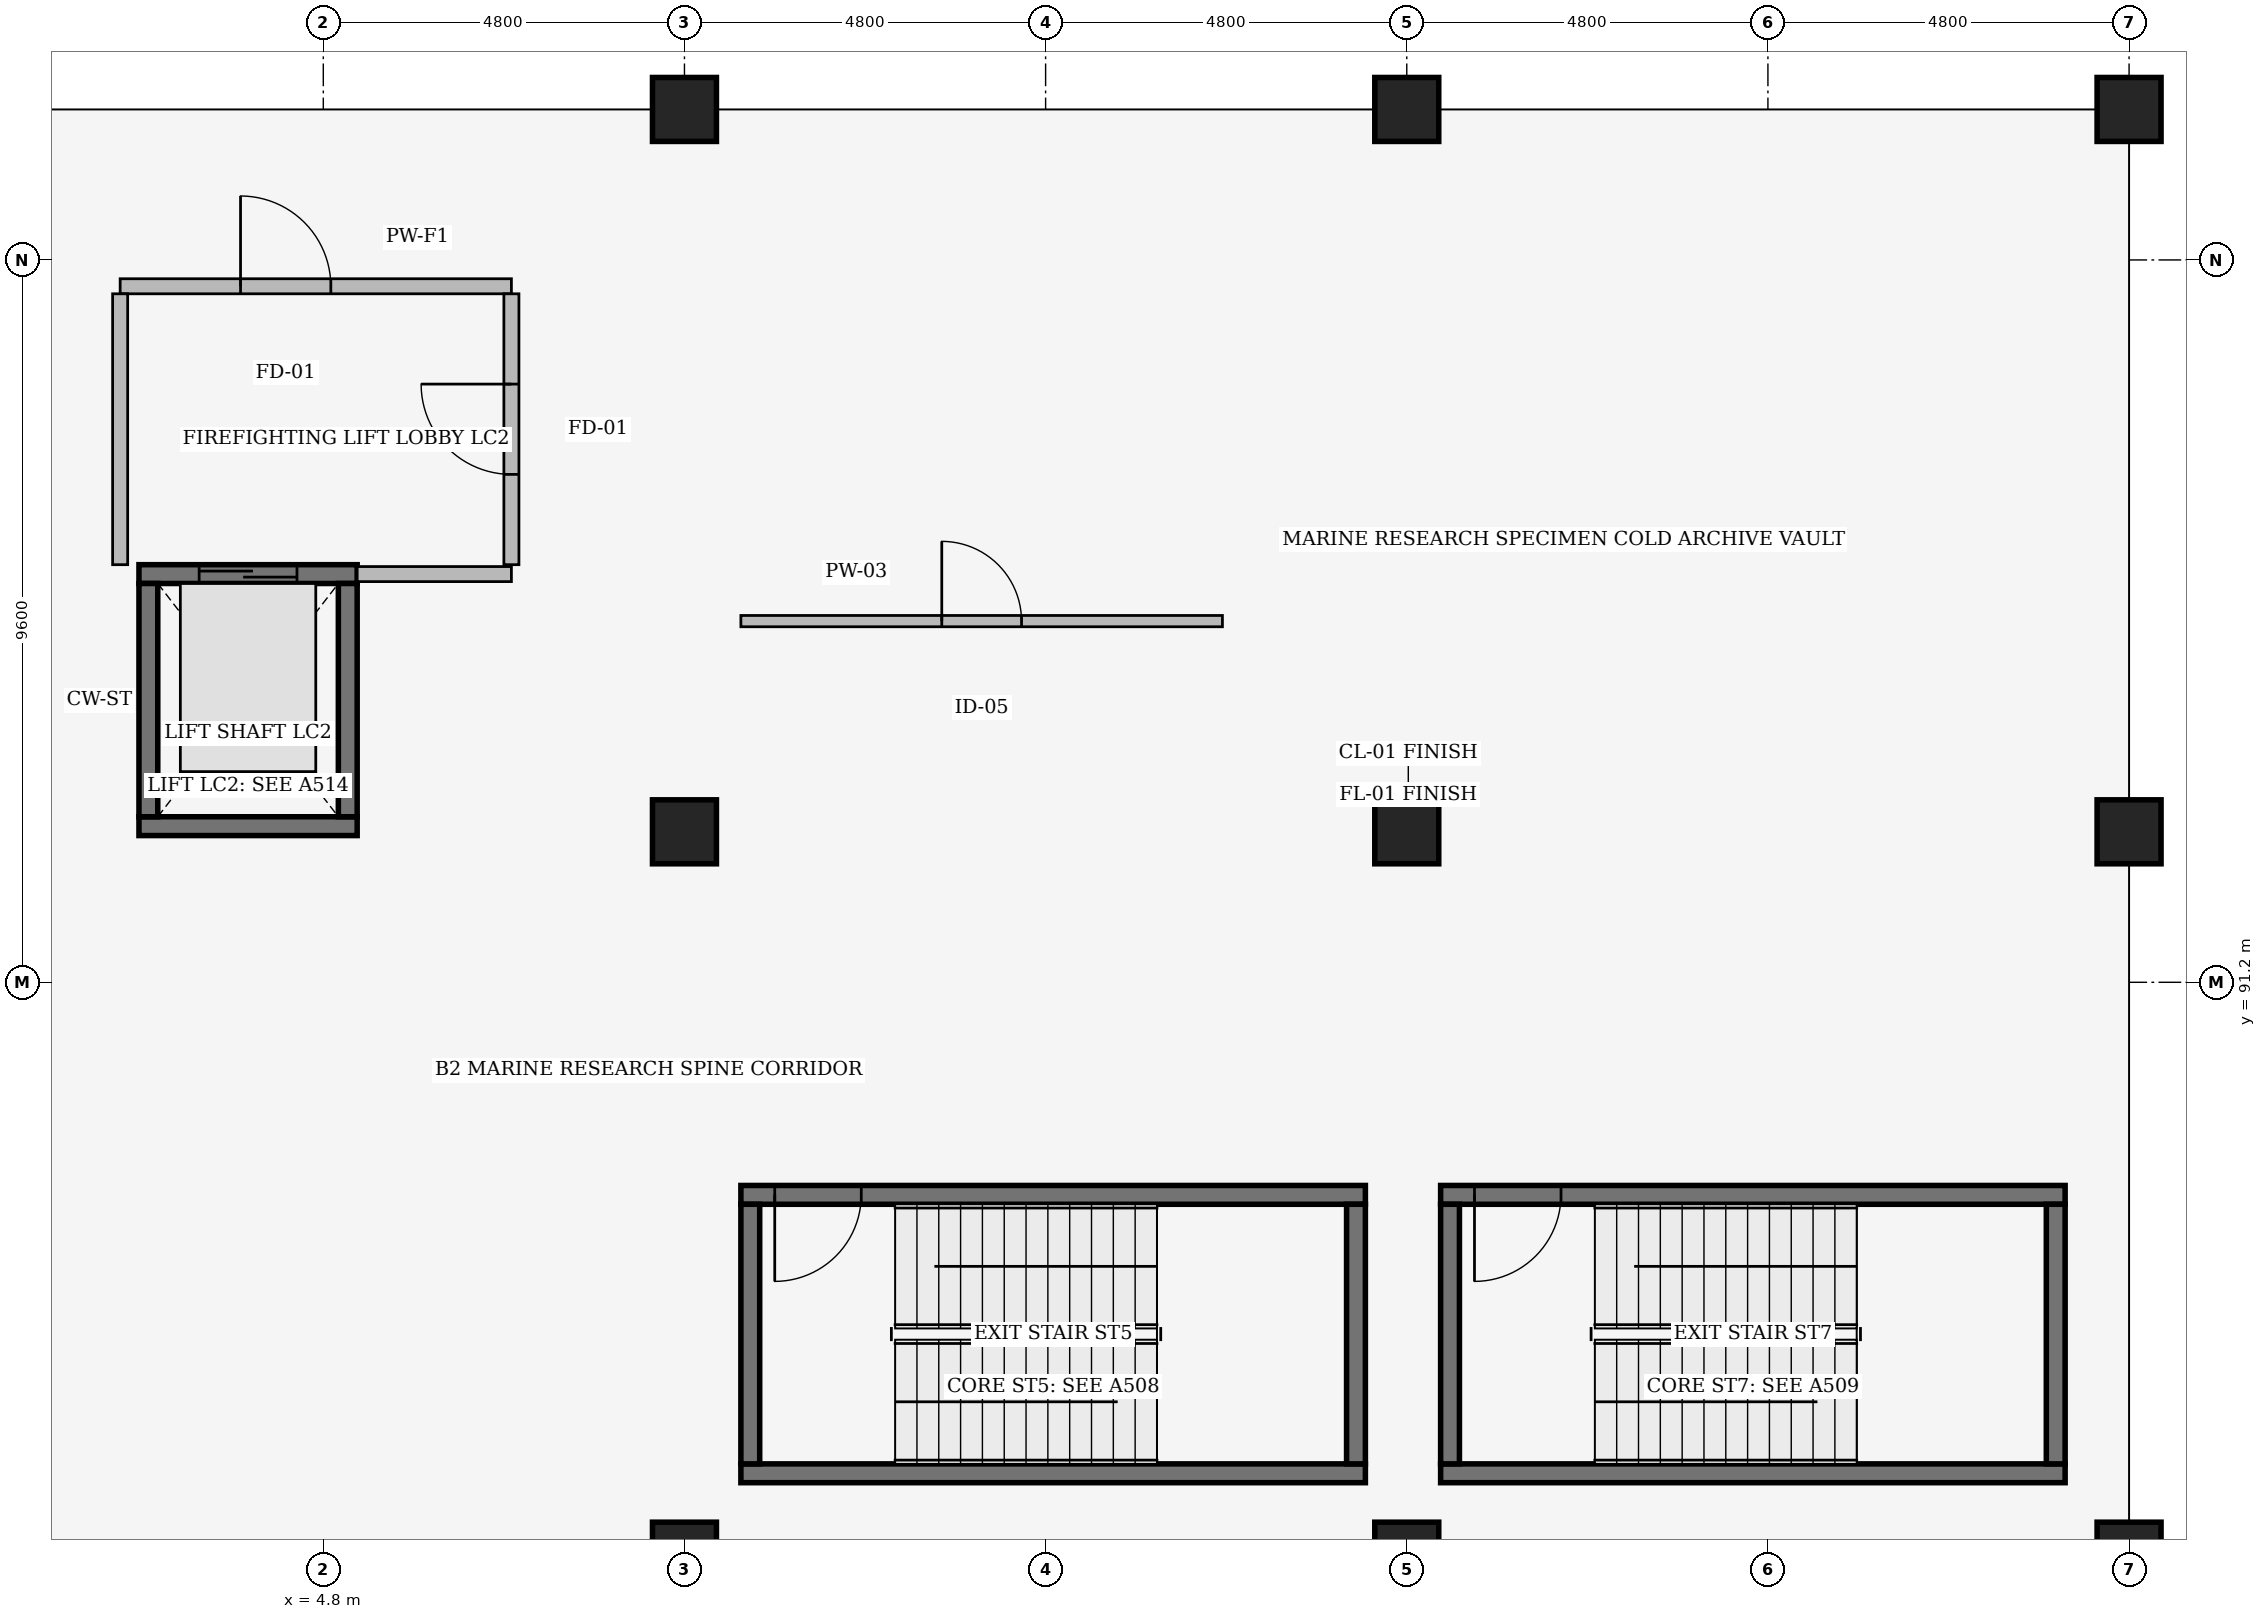
"""IFC4 building model, lengths in metres.
Left out: names, types, materials, properties, quantities, classifications, styles, units other than length and angle.
Written with IfcOpenShell. Run it as: python <this file> out.ifc"""

import sys

from ifc_helpers import new_model, si_unit, direction, frame, frame_2d, origin, origin_2d, place, context, subcontext, project, spatial, rectangle, extrude, element, fill, save


model = new_model("IFC4")
c1 = context("Model", 3, precision=1e-05, world=origin(), true_north=direction((0.0, 1.0)))
c2 = subcontext(c1, "Body", "Model", "MODEL_VIEW")
j1 = project(units=[si_unit("LENGTHUNIT", "METRE"), si_unit("PLANEANGLEUNIT", "RADIAN")], contexts=[c1])
p1 = place(None, origin())
s1 = spatial("IfcSite", under=j1, at=p1, CompositionType="ELEMENT")
p2 = place(p1, origin())
s2 = spatial("IfcBuilding", under=s1, at=p2, CompositionType="ELEMENT")
p3 = place(p2, frame((0.0, 0.0, -9.6)))
s3 = spatial("IfcBuildingStorey", under=s2, at=p3, CompositionType="ELEMENT", Elevation=-9.6)
for number, where, z_axis, x_axis in (
    (1, (9.6, 83.6, 0.0), (0.0, 0.0, 1.0), (1.0, 0.0, 0.0)),
    (2, (9.6, 93.2, 0.0), (0.0, 0.0, 1.0), (1.0, 0.0, 0.0)),
    (3, (9.6, 102.8, 0.0), (0.0, 0.0, 1.0), (1.0, 0.0, 0.0)),
    (4, (19.2, 83.6, 0.0), (0.0, 0.0, 1.0), (1.0, 0.0, 0.0)),
    (5, (19.2, 93.2, 0.0), (0.0, 0.0, 1.0), (1.0, 0.0, 0.0)),
    (6, (19.2, 102.8, 0.0), (0.0, 0.0, 1.0), (1.0, 0.0, 0.0)),
    (7, (28.8, 83.6, 0.0), (0.0, 0.0, 1.0), (1.0, 0.0, 0.0)),
    (8, (28.8, 93.2, 0.0), (0.0, 0.0, 1.0), (1.0, 0.0, 0.0)),
    (9, (28.8, 102.8, 0.0), (0.0, 0.0, 1.0), (1.0, 0.0, 0.0)),
):
    element("IfcColumn", number, at=place(p3, frame(where, z_axis=z_axis, x_axis=x_axis)), inside=s3, PredefinedType="COLUMN", context=c2, shape_type="SweptSolid", body=[
        extrude(rectangle(XDim=0.85, YDim=0.85, at=origin_2d()), origin(), (0.0, 0.0, 1.0), 4.8),
    ])
p4 = place(p3, frame((10.35, 84.675, 0.0), z_axis=(0.0, 0.0, 1.0), x_axis=(1.0, 0.0, 0.0)))
e10 = element("IfcWall", 10, at=p4, inside=s3, PredefinedType="SHEAR", context=c2, shape_type="SweptSolid", body=[
    extrude(rectangle(XDim=8.3, YDim=0.25, at=frame_2d((4.15, 0.0))), origin(), (0.0, 0.0, 1.0), 4.5),
])
p5 = place(p3, frame((18.65, 88.375, 0.0), z_axis=(0.0, 0.0, 1.0), x_axis=(-1.0, 0.0, 0.0)))
e11 = element("IfcWall", 11, at=p5, inside=s3, PredefinedType="SHEAR", context=c2, shape_type="SweptSolid", body=[
    extrude(rectangle(XDim=8.3, YDim=0.25, at=frame_2d((4.15, 0.0))), origin(), (0.0, 0.0, 1.0), 4.5),
])
p6 = place(p5, frame((7.85, 0.0, 0.0), z_axis=(0.0, 0.0, 1.0), x_axis=(-1.0, 0.0, 0.0)))
e12 = element("IfcOpeningElement", 12, at=p6, cuts=e11, PredefinedType="OPENING", context=c2, shape_type="SweptSolid", body=[
    extrude(rectangle(XDim=1.15, YDim=2.2, at=frame_2d((0.575, 1.1))), frame((0.0, 0.135, 0.0), z_axis=(0.0, -1.0, 0.0), x_axis=(1.0, 0.0, 0.0)), (0.0, 0.0, 1.0), 0.27),
])
for number, where, z_axis, x_axis in (
    (13, (10.475, 88.25, 0.0), (0.0, 0.0, 1.0), (0.0, -1.0, 0.0)),
    (14, (18.525, 84.8, 0.0), (0.0, 0.0, 1.0), (0.0, 1.0, 0.0)),
):
    element("IfcWall", number, at=place(p3, frame(where, z_axis=z_axis, x_axis=x_axis)), inside=s3, PredefinedType="SHEAR", context=c2, shape_type="SweptSolid", body=[
        extrude(rectangle(XDim=3.45, YDim=0.25, at=frame_2d((1.725, 0.0))), origin(), (0.0, 0.0, 1.0), 4.5),
    ])
p7 = place(p3, frame((19.65, 84.675, 0.0), z_axis=(0.0, 0.0, 1.0), x_axis=(1.0, 0.0, 0.0)))
e15 = element("IfcWall", 15, at=p7, inside=s3, PredefinedType="SHEAR", context=c2, shape_type="SweptSolid", body=[
    extrude(rectangle(XDim=8.3, YDim=0.25, at=frame_2d((4.15, 0.0))), origin(), (0.0, 0.0, 1.0), 4.5),
])
p8 = place(p3, frame((27.95, 88.375, 0.0), z_axis=(0.0, 0.0, 1.0), x_axis=(-1.0, 0.0, 0.0)))
e16 = element("IfcWall", 16, at=p8, inside=s3, PredefinedType="SHEAR", context=c2, shape_type="SweptSolid", body=[
    extrude(rectangle(XDim=8.3, YDim=0.25, at=frame_2d((4.15, 0.0))), origin(), (0.0, 0.0, 1.0), 4.5),
])
p9 = place(p8, frame((7.85, 0.0, 0.0), z_axis=(0.0, 0.0, 1.0), x_axis=(-1.0, 0.0, 0.0)))
e17 = element("IfcOpeningElement", 17, at=p9, cuts=e16, PredefinedType="OPENING", context=c2, shape_type="SweptSolid", body=[
    extrude(rectangle(XDim=1.15, YDim=2.2, at=frame_2d((0.575, 1.1))), frame((0.0, 0.135, 0.0), z_axis=(0.0, -1.0, 0.0), x_axis=(1.0, 0.0, 0.0)), (0.0, 0.0, 1.0), 0.27),
])
for number, where, z_axis, x_axis in (
    (18, (19.775, 88.25, 0.0), (0.0, 0.0, 1.0), (0.0, -1.0, 0.0)),
    (19, (27.825, 84.8, 0.0), (0.0, 0.0, 1.0), (0.0, 1.0, 0.0)),
):
    element("IfcWall", number, at=place(p3, frame(where, z_axis=z_axis, x_axis=x_axis)), inside=s3, PredefinedType="SHEAR", context=c2, shape_type="SweptSolid", body=[
        extrude(rectangle(XDim=3.45, YDim=0.25, at=frame_2d((1.725, 0.0))), origin(), (0.0, 0.0, 1.0), 4.5),
    ])
p10 = place(p3, frame((2.35, 93.275, 0.0), z_axis=(0.0, 0.0, 1.0), x_axis=(1.0, 0.0, 0.0)))
e20 = element("IfcWall", 20, at=p10, inside=s3, PredefinedType="SHEAR", context=c2, shape_type="SweptSolid", body=[
    extrude(rectangle(XDim=2.9, YDim=0.25, at=frame_2d((1.45, 0.0))), origin(), (0.0, 0.0, 1.0), 4.5),
])
p11 = place(p3, frame((2.35, 96.625, 0.0), z_axis=(0.0, 0.0, 1.0), x_axis=(1.0, 0.0, 0.0)))
e21 = element("IfcWall", 21, at=p11, inside=s3, PredefinedType="SHEAR", context=c2, shape_type="SweptSolid", body=[
    extrude(rectangle(XDim=2.9, YDim=0.25, at=frame_2d((1.45, 0.0))), origin(), (0.0, 0.0, 1.0), 4.5),
])
p12 = place(p11, frame((0.8, 0.0, 0.0)))
e22 = element("IfcOpeningElement", 22, at=p12, cuts=e21, PredefinedType="OPENING", context=c2, shape_type="SweptSolid", body=[
    extrude(rectangle(XDim=1.3, YDim=2.2, at=frame_2d((0.65, 1.1))), frame((0.0, 0.135, 0.0), z_axis=(0.0, -1.0, 0.0), x_axis=(1.0, 0.0, 0.0)), (0.0, 0.0, 1.0), 0.27),
])
for number, where, z_axis, x_axis in (
    (23, (2.475, 93.4, 0.0), (0.0, 0.0, 1.0), (0.0, 1.0, 0.0)),
    (24, (5.125, 93.4, 0.0), (0.0, 0.0, 1.0), (0.0, 1.0, 0.0)),
):
    element("IfcWall", number, at=place(p3, frame(where, z_axis=z_axis, x_axis=x_axis)), inside=s3, PredefinedType="SHEAR", context=c2, shape_type="SweptSolid", body=[
        extrude(rectangle(XDim=3.1, YDim=0.25, at=frame_2d((1.55, 0.0))), origin(), (0.0, 0.0, 1.0), 4.5),
    ])
p13 = place(p3, frame((2.1, 100.45, 0.0), z_axis=(0.0, 0.0, 1.0), x_axis=(1.0, 0.0, 0.0)))
e25 = element("IfcWall", 25, at=p13, inside=s3, PredefinedType="PARTITIONING", context=c2, shape_type="SweptSolid", body=[
    extrude(rectangle(XDim=5.2, YDim=0.2, at=frame_2d((2.6, 0.0))), origin(), (0.0, 0.0, 1.0), 4.214),
])
p14 = place(p13, frame((1.6, 0.0, 0.0)))
e26 = element("IfcOpeningElement", 26, at=p14, cuts=e25, PredefinedType="OPENING", context=c2, shape_type="SweptSolid", body=[
    extrude(rectangle(XDim=1.2, YDim=2.2, at=frame_2d((0.6, 1.1))), frame((0.0, 0.11, 0.0), z_axis=(0.0, -1.0, 0.0), x_axis=(1.0, 0.0, 0.0)), (0.0, 0.0, 1.0), 0.22),
])
p15 = place(p3, frame((2.1, 96.75, 0.0), z_axis=(0.0, 0.0, 1.0), x_axis=(0.0, 1.0, 0.0)))
e27 = element("IfcWall", 27, at=p15, inside=s3, PredefinedType="PARTITIONING", context=c2, shape_type="SweptSolid", body=[
    extrude(rectangle(XDim=3.6, YDim=0.2, at=frame_2d((1.8, 0.0))), origin(), (0.0, 0.0, 1.0), 4.156),
])
p16 = place(p3, frame((7.3, 96.75, 0.0), z_axis=(0.0, 0.0, 1.0), x_axis=(0.0, 1.0, 0.0)))
e28 = element("IfcWall", 28, at=p16, inside=s3, PredefinedType="PARTITIONING", context=c2, shape_type="SweptSolid", body=[
    extrude(rectangle(XDim=3.6, YDim=0.2, at=frame_2d((1.8, 0.0))), origin(), (0.0, 0.0, 1.0), 4.156),
])
p17 = place(p16, frame((1.2, 0.0, 0.0)))
e29 = element("IfcOpeningElement", 29, at=p17, cuts=e28, PredefinedType="OPENING", context=c2, shape_type="SweptSolid", body=[
    extrude(rectangle(XDim=1.2, YDim=2.2, at=frame_2d((0.6, 1.1))), frame((0.0, 0.11, 0.0), z_axis=(0.0, -1.0, 0.0), x_axis=(1.0, 0.0, 0.0)), (0.0, 0.0, 1.0), 0.22),
])
p18 = place(p3, frame((5.25, 96.625, 0.0), z_axis=(0.0, 0.0, 1.0), x_axis=(1.0, 0.0, 0.0)))
e30 = element("IfcWall", 30, at=p18, inside=s3, PredefinedType="PARTITIONING", context=c2, shape_type="SweptSolid", body=[
    extrude(rectangle(XDim=2.05, YDim=0.2, at=frame_2d((1.025, 0.0))), origin(), (0.0, 0.0, 1.0), 4.44),
])
p19 = place(p3, frame((10.35, 96.0, 0.0), z_axis=(0.0, 0.0, 1.0), x_axis=(1.0, 0.0, 0.0)))
e31 = element("IfcWall", 31, at=p19, inside=s3, PredefinedType="PARTITIONING", context=c2, shape_type="SweptSolid", body=[
    extrude(rectangle(XDim=6.4, YDim=0.15, at=frame_2d((3.2, 0.0))), origin(), (0.0, 0.0, 1.0), 4.049),
])
p20 = place(p19, frame((2.67, 0.0, 0.0)))
e32 = element("IfcOpeningElement", 32, at=p20, cuts=e31, PredefinedType="OPENING", context=c2, shape_type="SweptSolid", body=[
    extrude(rectangle(XDim=1.06, YDim=2.2, at=frame_2d((0.53, 1.1))), frame((0.0, 0.085, 0.0), z_axis=(0.0, -1.0, 0.0), x_axis=(1.0, 0.0, 0.0)), (0.0, 0.0, 1.0), 0.17),
])
p21 = place(p6, origin())
e33 = element("IfcDoor", 33, at=p21, inside=s3, OperationType="SINGLE_SWING_LEFT", PredefinedType="DOOR", context=c2, shape_type="SweptSolid", body=[
    extrude(rectangle(XDim=1.15, YDim=2.2, at=frame_2d((0.575, 1.1))), frame((0.0, 0.025, 0.0), z_axis=(0.0, -1.0, 0.0), x_axis=(1.0, 0.0, 0.0)), (0.0, 0.0, 1.0), 0.05),
])
fill(e12, e33)
p22 = place(p9, origin())
e34 = element("IfcDoor", 34, at=p22, inside=s3, OperationType="SINGLE_SWING_LEFT", PredefinedType="DOOR", context=c2, shape_type="SweptSolid", body=[
    extrude(rectangle(XDim=1.15, YDim=2.2, at=frame_2d((0.575, 1.1))), frame((0.0, 0.025, 0.0), z_axis=(0.0, -1.0, 0.0), x_axis=(1.0, 0.0, 0.0)), (0.0, 0.0, 1.0), 0.05),
])
fill(e17, e34)
p23 = place(p12, origin())
e35 = element("IfcDoor", 35, at=p23, inside=s3, OperationType="DOUBLE_DOOR_SLIDING", PredefinedType="DOOR", context=c2, shape_type="SweptSolid", body=[
    extrude(rectangle(XDim=1.3, YDim=2.2, at=frame_2d((0.65, 1.1))), frame((0.0, 0.025, 0.0), z_axis=(0.0, -1.0, 0.0), x_axis=(1.0, 0.0, 0.0)), (0.0, 0.0, 1.0), 0.05),
])
fill(e22, e35)
p24 = place(p17, origin())
e36 = element("IfcDoor", 36, at=p24, inside=s3, OperationType="SINGLE_SWING_RIGHT", PredefinedType="DOOR", context=c2, shape_type="SweptSolid", body=[
    extrude(rectangle(XDim=1.2, YDim=2.2, at=frame_2d((0.6, 1.1))), frame((0.0, 0.025, 0.0), z_axis=(0.0, -1.0, 0.0), x_axis=(1.0, 0.0, 0.0)), (0.0, 0.0, 1.0), 0.05),
])
fill(e29, e36)
p25 = place(p14, origin())
e37 = element("IfcDoor", 37, at=p25, inside=s3, OperationType="SINGLE_SWING_LEFT", PredefinedType="DOOR", context=c2, shape_type="SweptSolid", body=[
    extrude(rectangle(XDim=1.2, YDim=2.2, at=frame_2d((0.6, 1.1))), frame((0.0, 0.025, 0.0), z_axis=(0.0, -1.0, 0.0), x_axis=(1.0, 0.0, 0.0)), (0.0, 0.0, 1.0), 0.05),
])
fill(e26, e37)
p26 = place(p20, origin())
e38 = element("IfcDoor", 38, at=p26, inside=s3, OperationType="SINGLE_SWING_LEFT", PredefinedType="DOOR", context=c2, shape_type="SweptSolid", body=[
    extrude(rectangle(XDim=1.06, YDim=2.2, at=frame_2d((0.53, 1.1))), frame((0.0, 0.025, 0.0), z_axis=(0.0, -1.0, 0.0), x_axis=(1.0, 0.0, 0.0)), (0.0, 0.0, 1.0), 0.05),
])
fill(e32, e38)
save(model, sys.argv[1])
